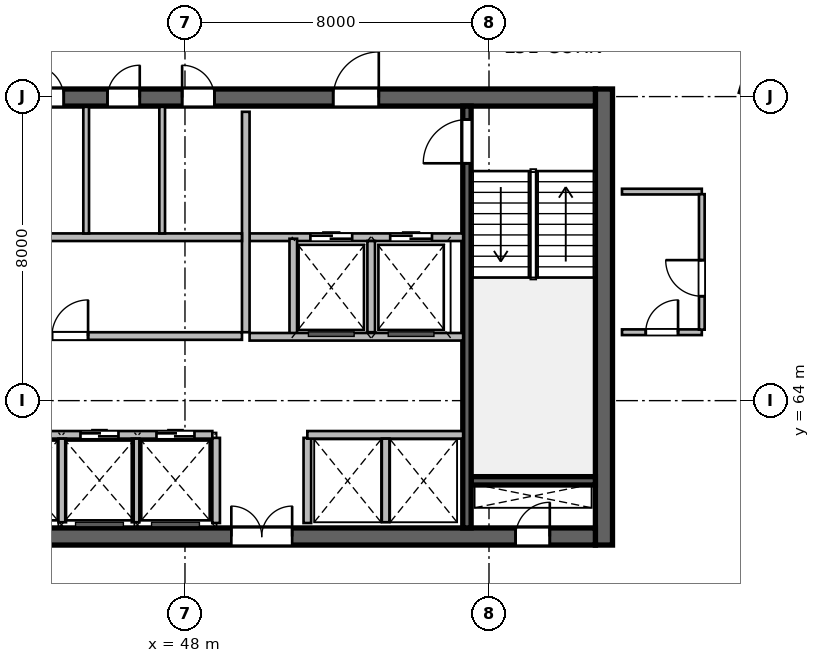
"""IFC4 building model, lengths in metres.
Left out: names, types, materials, properties, quantities, classifications, styles, units other than length and angle.
Written with IfcOpenShell. Run it as: python <this file> out.ifc"""

import sys

from ifc_helpers import new_model, si_unit, direction, frame, frame_2d, origin, place, context, subcontext, project, spatial, rectangle, extrude, source, transform, mapped, element, fill, save


model = new_model("IFC4")
c1 = context("Model", 3, precision=1e-05, world=origin(), true_north=direction((0.0, 1.0)))
c2 = subcontext(c1, "Body", "Model", "MODEL_VIEW")
j1 = project(units=[si_unit("LENGTHUNIT", "METRE"), si_unit("PLANEANGLEUNIT", "RADIAN")], contexts=[c1])
p1 = place(None, origin())
s1 = spatial("IfcSite", under=j1, at=p1, CompositionType="ELEMENT")
p2 = place(p1, origin())
s2 = spatial("IfcBuilding", under=s1, at=p2, CompositionType="ELEMENT")
p3 = place(p2, frame((0.0, 0.0, 211.8)))
s3 = spatial("IfcBuildingStorey", under=s2, at=p3, CompositionType="ELEMENT", Elevation=211.8)
m1 = source(origin(), c2, "Body", "SweptSolid", [
    extrude(rectangle(XDim=12.0, YDim=0.45, at=frame_2d((6.0, 0.0))), origin(), (0.0, 0.0, 1.0), 3.9),
])
p4 = place(p3, frame((59.025, 60.2, 0.0), z_axis=(0.0, 0.0, 1.0), x_axis=(0.0, 1.0, 0.0)))
e1 = element("IfcWall", 1, at=p4, inside=s3, PredefinedType="SHEAR", context=c2, shape_type="MappedRepresentation", body=[
    mapped(m1, transform((0.0, 0.0, 0.0), scale=1.0)),
])
m2 = source(origin(), c2, "Body", "SweptSolid", [
    extrude(rectangle(XDim=21.6, YDim=0.45, at=frame_2d((10.8, 0.0))), origin(), (0.0, 0.0, 1.0), 3.9),
])
p5 = place(p3, frame((37.2, 60.425, 0.0), z_axis=(0.0, 0.0, 1.0), x_axis=(1.0, 0.0, 0.0)))
e2 = element("IfcWall", 2, at=p5, inside=s3, PredefinedType="SHEAR", context=c2, shape_type="MappedRepresentation", body=[
    mapped(m2, transform((0.0, 0.0, 0.0), scale=1.0)),
])
p6 = place(p5, frame((1.1, 0.0, 0.0)))
e3 = element("IfcOpeningElement", 3, at=p6, cuts=e2, PredefinedType="OPENING", context=c2, shape_type="SweptSolid", body=[
    extrude(rectangle(XDim=1.15, YDim=2.15, at=frame_2d((0.575, 1.075))), frame((0.0, 0.235, 0.0), z_axis=(0.0, -1.0, 0.0), x_axis=(1.0, 0.0, 0.0)), (0.0, 0.0, 1.0), 0.47),
])
p7 = place(p5, frame((19.5, 0.0, 0.0)))
e4 = element("IfcOpeningElement", 4, at=p7, cuts=e2, PredefinedType="OPENING", context=c2, shape_type="SweptSolid", body=[
    extrude(rectangle(XDim=0.9, YDim=2.1, at=frame_2d((0.45, 1.05))), frame((0.0, 0.235, 0.0), z_axis=(0.0, -1.0, 0.0), x_axis=(1.0, 0.0, 0.0)), (0.0, 0.0, 1.0), 0.47),
])
p8 = place(p5, frame((12.02, 0.0, 0.0)))
e5 = element("IfcOpeningElement", 5, at=p8, cuts=e2, PredefinedType="OPENING", context=c2, shape_type="SweptSolid", body=[
    extrude(rectangle(XDim=1.6, YDim=2.15, at=frame_2d((0.8, 1.075))), frame((0.0, 0.235, 0.0), z_axis=(0.0, -1.0, 0.0), x_axis=(1.0, 0.0, 0.0)), (0.0, 0.0, 1.0), 0.47),
])
p9 = place(p3, frame((37.2, 71.975, 0.0), z_axis=(0.0, 0.0, 1.0), x_axis=(1.0, 0.0, 0.0)))
e6 = element("IfcWall", 6, at=p9, inside=s3, PredefinedType="SHEAR", context=c2, shape_type="MappedRepresentation", body=[
    mapped(m2, transform((0.0, 0.0, 0.0), scale=1.0)),
])
p10 = place(p9, frame((1.2, 0.0, 0.0)))
e7 = element("IfcOpeningElement", 7, at=p10, cuts=e6, PredefinedType="OPENING", context=c2, shape_type="SweptSolid", body=[
    extrude(rectangle(XDim=0.9, YDim=2.1, at=frame_2d((0.45, 1.05))), frame((0.0, 0.235, 0.0), z_axis=(0.0, -1.0, 0.0), x_axis=(1.0, 0.0, 0.0)), (0.0, 0.0, 1.0), 0.47),
])
p11 = place(p9, frame((14.7, 0.0, 0.0)))
e8 = element("IfcOpeningElement", 8, at=p11, cuts=e6, PredefinedType="OPENING", context=c2, shape_type="SweptSolid", body=[
    extrude(rectangle(XDim=1.2, YDim=2.15, at=frame_2d((0.6, 1.075))), frame((0.0, 0.235, 0.0), z_axis=(0.0, -1.0, 0.0), x_axis=(1.0, 0.0, 0.0)), (0.0, 0.0, 1.0), 0.47),
])
p12 = place(p9, frame((4.15, 0.0, 0.0)))
e9 = element("IfcOpeningElement", 9, at=p12, cuts=e6, PredefinedType="OPENING", context=c2, shape_type="SweptSolid", body=[
    extrude(rectangle(XDim=1.3, YDim=2.15, at=frame_2d((0.65, 1.075))), frame((0.0, 0.235, 0.0), z_axis=(0.0, -1.0, 0.0), x_axis=(1.0, 0.0, 0.0)), (0.0, 0.0, 1.0), 0.47),
])
p13 = place(p9, frame((6.76, 0.0, 0.0)))
e10 = element("IfcOpeningElement", 10, at=p13, cuts=e6, PredefinedType="OPENING", context=c2, shape_type="SweptSolid", body=[
    extrude(rectangle(XDim=0.85, YDim=2.1, at=frame_2d((0.425, 1.05))), frame((0.0, 0.235, 0.0), z_axis=(0.0, -1.0, 0.0), x_axis=(1.0, 0.0, 0.0)), (0.0, 0.0, 1.0), 0.47),
])
p14 = place(p9, frame((8.76, 0.0, 0.0)))
e11 = element("IfcOpeningElement", 11, at=p14, cuts=e6, PredefinedType="OPENING", context=c2, shape_type="SweptSolid", body=[
    extrude(rectangle(XDim=0.85, YDim=2.1, at=frame_2d((0.425, 1.05))), frame((0.0, 0.235, 0.0), z_axis=(0.0, -1.0, 0.0), x_axis=(1.0, 0.0, 0.0)), (0.0, 0.0, 1.0), 0.47),
])
p15 = place(p9, frame((10.725, 0.0, 0.0)))
e12 = element("IfcOpeningElement", 12, at=p15, cuts=e6, PredefinedType="OPENING", context=c2, shape_type="SweptSolid", body=[
    extrude(rectangle(XDim=0.85, YDim=2.1, at=frame_2d((0.425, 1.05))), frame((0.0, 0.235, 0.0), z_axis=(0.0, -1.0, 0.0), x_axis=(1.0, 0.0, 0.0)), (0.0, 0.0, 1.0), 0.47),
])
m3 = source(origin(), c2, "Body", "SweptSolid", [
    extrude(rectangle(XDim=3.27, YDim=0.22, at=frame_2d((1.635, 0.0))), origin(), (0.0, 0.0, 1.0), 3.9),
])
p16 = place(p3, frame((55.53, 61.89, 0.0), z_axis=(0.0, 0.0, 1.0), x_axis=(1.0, 0.0, 0.0)))
e13 = element("IfcWall", 13, at=p16, inside=s3, PredefinedType="SHEAR", context=c2, shape_type="MappedRepresentation", body=[
    mapped(m3, transform((0.0, 0.0, 0.0), scale=1.0)),
])
m4 = source(origin(), c2, "Body", "SweptSolid", [
    extrude(rectangle(XDim=11.1, YDim=0.22, at=frame_2d((5.55, 0.0))), origin(), (0.0, 0.0, 1.0), 3.9),
])
p17 = place(p3, frame((55.42, 60.65, 0.0), z_axis=(0.0, 0.0, 1.0), x_axis=(0.0, 1.0, 0.0)))
e14 = element("IfcWall", 14, at=p17, inside=s3, PredefinedType="SHEAR", context=c2, shape_type="MappedRepresentation", body=[
    mapped(m4, transform((0.0, 0.0, 0.0), scale=1.0)),
])
p18 = place(p17, frame((9.595, 0.0, 0.0)))
e15 = element("IfcOpeningElement", 15, at=p18, cuts=e14, PredefinedType="OPENING", context=c2, shape_type="SweptSolid", body=[
    extrude(rectangle(XDim=1.15, YDim=2.15, at=frame_2d((0.575, 1.075))), frame((0.0, 0.12, 0.0), z_axis=(0.0, -1.0, 0.0), x_axis=(1.0, 0.0, 0.0)), (0.0, 0.0, 1.0), 0.24),
])
m5 = source(origin(), c2, "Body", "SweptSolid", [
    extrude(rectangle(XDim=2.24, YDim=0.2, at=frame_2d((1.12, 0.0))), origin(), (0.0, 0.0, 1.0), 3.64),
])
for number, where, z_axis, x_axis in (
    (16, (48.82, 60.78, 0.0), (0.0, 0.0, 1.0), (0.0, 1.0, 0.0)),
    (17, (51.22, 60.78, 0.0), (0.0, 0.0, 1.0), (0.0, 1.0, 0.0)),
):
    element("IfcWall", number, at=place(p3, frame(where, z_axis=z_axis, x_axis=x_axis)), inside=s3, PredefinedType="SOLIDWALL", context=c2, shape_type="MappedRepresentation", body=[
        mapped(m5, transform((0.0, 0.0, 0.0), scale=1.0)),
    ])
m6 = source(origin(), c2, "Body", "SweptSolid", [
    extrude(rectangle(XDim=5.62, YDim=0.2, at=frame_2d((2.81, 0.0))), origin(), (0.0, 0.0, 1.0), 3.64),
])
p19 = place(p3, frame((49.7, 68.3, 0.0), z_axis=(0.0, 0.0, 1.0), x_axis=(1.0, 0.0, 0.0)))
e18 = element("IfcWall", 18, at=p19, inside=s3, PredefinedType="SOLIDWALL", context=c2, shape_type="MappedRepresentation", body=[
    mapped(m6, transform((0.0, 0.0, 0.0), scale=1.0)),
])
p20 = place(p19, frame((1.6, 0.0, 0.0)))
e19 = element("IfcOpeningElement", 19, at=p20, cuts=e18, PredefinedType="OPENING", context=c2, shape_type="SweptSolid", body=[
    extrude(rectangle(XDim=1.1, YDim=2.15, at=frame_2d((0.55, 1.075))), frame((0.0, 0.11, 0.0), z_axis=(0.0, -1.0, 0.0), x_axis=(1.0, 0.0, 0.0)), (0.0, 0.0, 1.0), 0.22),
])
p21 = place(p19, frame((3.7, 0.0, 0.0)))
e20 = element("IfcOpeningElement", 20, at=p21, cuts=e18, PredefinedType="OPENING", context=c2, shape_type="SweptSolid", body=[
    extrude(rectangle(XDim=1.1, YDim=2.15, at=frame_2d((0.55, 1.075))), frame((0.0, 0.11, 0.0), z_axis=(0.0, -1.0, 0.0), x_axis=(1.0, 0.0, 0.0)), (0.0, 0.0, 1.0), 0.22),
])
m7 = source(origin(), c2, "Body", "SweptSolid", [
    extrude(rectangle(XDim=5.8, YDim=0.2, at=frame_2d((2.9, 0.0))), origin(), (0.0, 0.0, 1.0), 3.64),
])
p22 = place(p3, frame((49.6, 65.8, 0.0), z_axis=(0.0, 0.0, 1.0), x_axis=(0.0, 1.0, 0.0)))
e21 = element("IfcWall", 21, at=p22, inside=s3, PredefinedType="SOLIDWALL", context=c2, shape_type="MappedRepresentation", body=[
    mapped(m7, transform((0.0, 0.0, 0.0), scale=1.0)),
])
m8 = source(origin(), c2, "Body", "SweptSolid", [
    extrude(rectangle(XDim=2.58, YDim=0.2, at=frame_2d((1.29, 0.0))), origin(), (0.0, 0.0, 1.0), 3.64),
])
p23 = place(p3, frame((50.85, 65.68, 0.0), z_axis=(0.0, 0.0, 1.0), x_axis=(0.0, 1.0, 0.0)))
e22 = element("IfcWall", 22, at=p23, inside=s3, PredefinedType="SOLIDWALL", context=c2, shape_type="MappedRepresentation", body=[
    mapped(m8, transform((0.0, 0.0, 0.0), scale=1.0)),
])
m9 = source(origin(), c2, "Body", "SweptSolid", [
    extrude(rectangle(XDim=2.4, YDim=0.2, at=frame_2d((1.2, 0.0))), origin(), (0.0, 0.0, 1.0), 3.64),
])
p24 = place(p3, frame((52.9, 65.8, 0.0), z_axis=(0.0, 0.0, 1.0), x_axis=(0.0, 1.0, 0.0)))
e23 = element("IfcWall", 23, at=p24, inside=s3, PredefinedType="SOLIDWALL", context=c2, shape_type="MappedRepresentation", body=[
    mapped(m9, transform((0.0, 0.0, 0.0), scale=1.0)),
])
p25 = place(p3, frame((49.7, 65.68, 0.0), z_axis=(0.0, 0.0, 1.0), x_axis=(1.0, 0.0, 0.0)))
e24 = element("IfcWall", 24, at=p25, inside=s3, PredefinedType="SOLIDWALL", context=c2, shape_type="MappedRepresentation", body=[
    mapped(m6, transform((0.0, 0.0, 0.0), scale=1.0)),
])
m10 = source(origin(), c2, "Body", "SweptSolid", [
    extrude(rectangle(XDim=8.8, YDim=0.2, at=frame_2d((4.4, 0.0))), origin(), (0.0, 0.0, 1.0), 3.64),
])
p26 = place(p3, frame((40.7, 68.3, 0.0), z_axis=(0.0, 0.0, 1.0), x_axis=(1.0, 0.0, 0.0)))
e25 = element("IfcWall", 25, at=p26, inside=s3, PredefinedType="SOLIDWALL", context=c2, shape_type="MappedRepresentation", body=[
    mapped(m10, transform((0.0, 0.0, 0.0), scale=1.0)),
])
m11 = source(origin(), c2, "Body", "SweptSolid", [
    extrude(rectangle(XDim=3.33, YDim=0.15, at=frame_2d((1.665, 0.0))), origin(), (0.0, 0.0, 1.0), 3.64),
])
for number, where, z_axis, x_axis in (
    (26, (45.4, 68.4, 0.0), (0.0, 0.0, 1.0), (0.0, 1.0, 0.0)),
    (27, (47.4, 68.4, 0.0), (0.0, 0.0, 1.0), (0.0, 1.0, 0.0)),
):
    element("IfcWall", number, at=place(p3, frame(where, z_axis=z_axis, x_axis=x_axis)), inside=s3, PredefinedType="PARTITIONING", context=c2, shape_type="MappedRepresentation", body=[
        mapped(m11, transform((0.0, 0.0, 0.0), scale=1.0)),
    ])
m12 = source(origin(), c2, "Body", "SweptSolid", [
    extrude(rectangle(XDim=8.02, YDim=0.2, at=frame_2d((4.01, 0.0))), origin(), (0.0, 0.0, 1.0), 3.64),
])
p27 = place(p3, frame((40.7, 63.1, 0.0), z_axis=(0.0, 0.0, 1.0), x_axis=(1.0, 0.0, 0.0)))
e28 = element("IfcWall", 28, at=p27, inside=s3, PredefinedType="SOLIDWALL", context=c2, shape_type="MappedRepresentation", body=[
    mapped(m12, transform((0.0, 0.0, 0.0), scale=1.0)),
])
p28 = place(p27, frame((0.72, 0.0, 0.0)))
e29 = element("IfcOpeningElement", 29, at=p28, cuts=e28, PredefinedType="OPENING", context=c2, shape_type="SweptSolid", body=[
    extrude(rectangle(XDim=1.0, YDim=2.15, at=frame_2d((0.5, 1.075))), frame((0.0, 0.11, 0.0), z_axis=(0.0, -1.0, 0.0), x_axis=(1.0, 0.0, 0.0)), (0.0, 0.0, 1.0), 0.22),
])
p29 = place(p27, frame((2.62, 0.0, 0.0)))
e30 = element("IfcOpeningElement", 30, at=p29, cuts=e28, PredefinedType="OPENING", context=c2, shape_type="SweptSolid", body=[
    extrude(rectangle(XDim=1.0, YDim=2.15, at=frame_2d((0.5, 1.075))), frame((0.0, 0.11, 0.0), z_axis=(0.0, -1.0, 0.0), x_axis=(1.0, 0.0, 0.0)), (0.0, 0.0, 1.0), 0.22),
])
p30 = place(p27, frame((4.55, 0.0, 0.0)))
e31 = element("IfcOpeningElement", 31, at=p30, cuts=e28, PredefinedType="OPENING", context=c2, shape_type="SweptSolid", body=[
    extrude(rectangle(XDim=1.0, YDim=2.15, at=frame_2d((0.5, 1.075))), frame((0.0, 0.11, 0.0), z_axis=(0.0, -1.0, 0.0), x_axis=(1.0, 0.0, 0.0)), (0.0, 0.0, 1.0), 0.22),
])
p31 = place(p27, frame((6.55, 0.0, 0.0)))
e32 = element("IfcOpeningElement", 32, at=p31, cuts=e28, PredefinedType="OPENING", context=c2, shape_type="SweptSolid", body=[
    extrude(rectangle(XDim=1.0, YDim=2.15, at=frame_2d((0.5, 1.075))), frame((0.0, 0.11, 0.0), z_axis=(0.0, -1.0, 0.0), x_axis=(1.0, 0.0, 0.0)), (0.0, 0.0, 1.0), 0.22),
])
m13 = source(origin(), c2, "Body", "SweptSolid", [
    extrude(rectangle(XDim=4.1, YDim=0.2, at=frame_2d((2.05, 0.0))), origin(), (0.0, 0.0, 1.0), 3.64),
])
p32 = place(p3, frame((51.22, 63.1, 0.0), z_axis=(0.0, 0.0, 1.0), x_axis=(1.0, 0.0, 0.0)))
e33 = element("IfcWall", 33, at=p32, inside=s3, PredefinedType="SOLIDWALL", context=c2, shape_type="MappedRepresentation", body=[
    mapped(m13, transform((0.0, 0.0, 0.0), scale=1.0)),
])
m14 = source(origin(), c2, "Body", "SweptSolid", [
    extrude(rectangle(XDim=2.2, YDim=0.2, at=frame_2d((1.1, 0.0))), origin(), (0.0, 0.0, 1.0), 3.64),
])
for number, where, z_axis, x_axis in (
    (34, (44.77, 60.8, 0.0), (0.0, 0.0, 1.0), (0.0, 1.0, 0.0)),
    (35, (46.7, 60.8, 0.0), (0.0, 0.0, 1.0), (0.0, 1.0, 0.0)),
    (36, (53.28, 60.8, 0.0), (0.0, 0.0, 1.0), (0.0, 1.0, 0.0)),
):
    element("IfcWall", number, at=place(p3, frame(where, z_axis=z_axis, x_axis=x_axis)), inside=s3, PredefinedType="SOLIDWALL", context=c2, shape_type="MappedRepresentation", body=[
        mapped(m14, transform((0.0, 0.0, 0.0), scale=1.0)),
    ])
p33 = place(p3, frame((40.7, 65.7, 0.0), z_axis=(0.0, 0.0, 1.0), x_axis=(1.0, 0.0, 0.0)))
e37 = element("IfcWall", 37, at=p33, inside=s3, PredefinedType="SOLIDWALL", context=c2, shape_type="MappedRepresentation", body=[
    mapped(m10, transform((0.0, 0.0, 0.0), scale=1.0)),
])
p34 = place(p33, frame((3.8, 0.0, 0.0)))
e38 = element("IfcOpeningElement", 38, at=p34, cuts=e37, PredefinedType="OPENING", context=c2, shape_type="SweptSolid", body=[
    extrude(rectangle(XDim=0.95, YDim=2.15, at=frame_2d((0.475, 1.075))), frame((0.0, 0.11, 0.0), z_axis=(0.0, -1.0, 0.0), x_axis=(1.0, 0.0, 0.0)), (0.0, 0.0, 1.0), 0.22),
])
m15 = source(origin(), c2, "Body", "SweptSolid", [
    extrude(rectangle(XDim=2.1, YDim=0.15, at=frame_2d((1.05, 0.0))), origin(), (0.0, 0.0, 1.0), 3.64),
])
p35 = place(p3, frame((59.5, 65.8, 0.0), z_axis=(0.0, 0.0, 1.0), x_axis=(1.0, 0.0, 0.0)))
e39 = element("IfcWall", 39, at=p35, inside=s3, PredefinedType="PARTITIONING", context=c2, shape_type="MappedRepresentation", body=[
    mapped(m15, transform((0.0, 0.0, 0.0), scale=1.0)),
])
p36 = place(p35, frame((0.625, 0.0, 0.0)))
e40 = element("IfcOpeningElement", 40, at=p36, cuts=e39, PredefinedType="OPENING", context=c2, shape_type="SweptSolid", body=[
    extrude(rectangle(XDim=0.85, YDim=2.1, at=frame_2d((0.425, 1.05))), frame((0.0, 0.085, 0.0), z_axis=(0.0, -1.0, 0.0), x_axis=(1.0, 0.0, 0.0)), (0.0, 0.0, 1.0), 0.17),
])
p37 = place(p3, frame((59.5, 69.5, 0.0), z_axis=(0.0, 0.0, 1.0), x_axis=(1.0, 0.0, 0.0)))
e41 = element("IfcWall", 41, at=p37, inside=s3, PredefinedType="PARTITIONING", context=c2, shape_type="MappedRepresentation", body=[
    mapped(m15, transform((0.0, 0.0, 0.0), scale=1.0)),
])
m16 = source(origin(), c2, "Body", "SweptSolid", [
    extrude(rectangle(XDim=3.565, YDim=0.15, at=frame_2d((1.783, 0.0))), origin(), (0.0, 0.0, 1.0), 3.64),
])
p38 = place(p3, frame((61.6, 65.867, 0.0), z_axis=(0.0, 0.0, 1.0), x_axis=(0.0, 1.0, 0.0)))
e42 = element("IfcWall", 42, at=p38, inside=s3, PredefinedType="PARTITIONING", context=c2, shape_type="MappedRepresentation", body=[
    mapped(m16, transform((0.0, 0.0, 0.0), scale=1.0)),
])
p39 = place(p38, frame((0.88, 0.0, 0.0)))
e43 = element("IfcOpeningElement", 43, at=p39, cuts=e42, PredefinedType="OPENING", context=c2, shape_type="SweptSolid", body=[
    extrude(rectangle(XDim=0.95, YDim=2.1, at=frame_2d((0.475, 1.05))), frame((0.0, 0.085, 0.0), z_axis=(0.0, -1.0, 0.0), x_axis=(1.0, 0.0, 0.0)), (0.0, 0.0, 1.0), 0.17),
])
m17 = source(origin(), c2, "Body", "SweptSolid", [
    extrude(rectangle(XDim=0.9, YDim=2.1, at=frame_2d((0.45, 1.05))), frame((0.0, 0.025, 0.0), z_axis=(0.0, -1.0, 0.0), x_axis=(1.0, 0.0, 0.0)), (0.0, 0.0, 1.0), 0.05),
])
p40 = place(p7, origin())
e44 = element("IfcDoor", 44, at=p40, inside=s3, OperationType="SINGLE_SWING_RIGHT", PredefinedType="DOOR", context=c2, shape_type="MappedRepresentation", body=[
    mapped(m17, transform((0.0, 0.0, 0.0), scale=1.0)),
])
fill(e4, e44)
m18 = source(origin(), c2, "Body", "SweptSolid", [
    extrude(rectangle(XDim=1.15, YDim=2.15, at=frame_2d((0.575, 1.075))), frame((0.0, 0.025, 0.0), z_axis=(0.0, -1.0, 0.0), x_axis=(1.0, 0.0, 0.0)), (0.0, 0.0, 1.0), 0.05),
])
p41 = place(p18, origin())
e45 = element("IfcDoor", 45, at=p41, inside=s3, OperationType="SINGLE_SWING_LEFT", PredefinedType="DOOR", context=c2, shape_type="MappedRepresentation", body=[
    mapped(m18, transform((0.0, 0.0, 0.0), scale=1.0)),
])
fill(e15, e45)
m19 = source(origin(), c2, "Body", "SweptSolid", [
    extrude(rectangle(XDim=1.6, YDim=2.15, at=frame_2d((0.8, 1.075))), frame((0.0, 0.025, 0.0), z_axis=(0.0, -1.0, 0.0), x_axis=(1.0, 0.0, 0.0)), (0.0, 0.0, 1.0), 0.05),
])
p42 = place(p8, origin())
e46 = element("IfcDoor", 46, at=p42, inside=s3, OperationType="DOUBLE_DOOR_SINGLE_SWING", PredefinedType="DOOR", context=c2, shape_type="MappedRepresentation", body=[
    mapped(m19, transform((0.0, 0.0, 0.0), scale=1.0)),
])
fill(e5, e46)
m20 = source(origin(), c2, "Body", "SweptSolid", [
    extrude(rectangle(XDim=1.2, YDim=2.15, at=frame_2d((0.6, 1.075))), frame((0.0, 0.025, 0.0), z_axis=(0.0, -1.0, 0.0), x_axis=(1.0, 0.0, 0.0)), (0.0, 0.0, 1.0), 0.05),
])
p43 = place(p11, origin())
e47 = element("IfcDoor", 47, at=p43, inside=s3, OperationType="SINGLE_SWING_RIGHT", PredefinedType="DOOR", context=c2, shape_type="MappedRepresentation", body=[
    mapped(m20, transform((0.0, 0.0, 0.0), scale=1.0)),
])
fill(e8, e47)
m21 = source(origin(), c2, "Body", "SweptSolid", [
    extrude(rectangle(XDim=1.1, YDim=2.15, at=frame_2d((0.55, 1.075))), frame((0.0, 0.025, 0.0), z_axis=(0.0, -1.0, 0.0), x_axis=(1.0, 0.0, 0.0)), (0.0, 0.0, 1.0), 0.05),
])
p44 = place(p20, origin())
e48 = element("IfcDoor", 48, at=p44, inside=s3, OperationType="DOUBLE_DOOR_SLIDING", PredefinedType="DOOR", context=c2, shape_type="MappedRepresentation", body=[
    mapped(m21, transform((0.0, 0.0, 0.0), scale=1.0)),
])
fill(e19, e48)
p45 = place(p21, origin())
e49 = element("IfcDoor", 49, at=p45, inside=s3, OperationType="DOUBLE_DOOR_SLIDING", PredefinedType="DOOR", context=c2, shape_type="MappedRepresentation", body=[
    mapped(m21, transform((0.0, 0.0, 0.0), scale=1.0)),
])
fill(e20, e49)
m22 = source(origin(), c2, "Body", "SweptSolid", [
    extrude(rectangle(XDim=0.85, YDim=2.1, at=frame_2d((0.425, 1.05))), frame((0.0, 0.025, 0.0), z_axis=(0.0, -1.0, 0.0), x_axis=(1.0, 0.0, 0.0)), (0.0, 0.0, 1.0), 0.05),
])
p46 = place(p13, origin())
e50 = element("IfcDoor", 50, at=p46, inside=s3, OperationType="SINGLE_SWING_LEFT", PredefinedType="DOOR", context=c2, shape_type="MappedRepresentation", body=[
    mapped(m22, transform((0.0, 0.0, 0.0), scale=1.0)),
])
fill(e10, e50)
p47 = place(p14, origin())
e51 = element("IfcDoor", 51, at=p47, inside=s3, OperationType="SINGLE_SWING_RIGHT", PredefinedType="DOOR", context=c2, shape_type="MappedRepresentation", body=[
    mapped(m22, transform((0.0, 0.0, 0.0), scale=1.0)),
])
fill(e11, e51)
p48 = place(p15, origin())
e52 = element("IfcDoor", 52, at=p48, inside=s3, OperationType="SINGLE_SWING_LEFT", PredefinedType="DOOR", context=c2, shape_type="MappedRepresentation", body=[
    mapped(m22, transform((0.0, 0.0, 0.0), scale=1.0)),
])
fill(e12, e52)
m23 = source(origin(), c2, "Body", "SweptSolid", [
    extrude(rectangle(XDim=1.0, YDim=2.15, at=frame_2d((0.5, 1.075))), frame((0.0, 0.025, 0.0), z_axis=(0.0, -1.0, 0.0), x_axis=(1.0, 0.0, 0.0)), (0.0, 0.0, 1.0), 0.05),
])
p49 = place(p30, origin())
e53 = element("IfcDoor", 53, at=p49, inside=s3, OperationType="DOUBLE_DOOR_SLIDING", PredefinedType="DOOR", context=c2, shape_type="MappedRepresentation", body=[
    mapped(m23, transform((0.0, 0.0, 0.0), scale=1.0)),
])
fill(e31, e53)
p50 = place(p31, origin())
e54 = element("IfcDoor", 54, at=p50, inside=s3, OperationType="DOUBLE_DOOR_SLIDING", PredefinedType="DOOR", context=c2, shape_type="MappedRepresentation", body=[
    mapped(m23, transform((0.0, 0.0, 0.0), scale=1.0)),
])
fill(e32, e54)
m24 = source(origin(), c2, "Body", "SweptSolid", [
    extrude(rectangle(XDim=0.95, YDim=2.15, at=frame_2d((0.475, 1.075))), frame((0.0, 0.025, 0.0), z_axis=(0.0, -1.0, 0.0), x_axis=(1.0, 0.0, 0.0)), (0.0, 0.0, 1.0), 0.05),
])
p51 = place(p34, origin())
e55 = element("IfcDoor", 55, at=p51, inside=s3, OperationType="SINGLE_SWING_RIGHT", PredefinedType="DOOR", context=c2, shape_type="MappedRepresentation", body=[
    mapped(m24, transform((0.0, 0.0, 0.0), scale=1.0)),
])
fill(e38, e55)
p52 = place(p36, origin())
e56 = element("IfcDoor", 56, at=p52, inside=s3, OperationType="SINGLE_SWING_RIGHT", PredefinedType="DOOR", context=c2, shape_type="MappedRepresentation", body=[
    mapped(m22, transform((0.0, 0.0, 0.0), scale=1.0)),
])
fill(e40, e56)
m25 = source(origin(), c2, "Body", "SweptSolid", [
    extrude(rectangle(XDim=0.95, YDim=2.1, at=frame_2d((0.475, 1.05))), frame((0.0, 0.025, 0.0), z_axis=(0.0, -1.0, 0.0), x_axis=(1.0, 0.0, 0.0)), (0.0, 0.0, 1.0), 0.05),
])
p53 = place(p39, origin())
e57 = element("IfcDoor", 57, at=p53, inside=s3, OperationType="SINGLE_SWING_RIGHT", PredefinedType="DOOR", context=c2, shape_type="MappedRepresentation", body=[
    mapped(m25, transform((0.0, 0.0, 0.0), scale=1.0)),
])
fill(e43, e57)
save(model, sys.argv[1])
